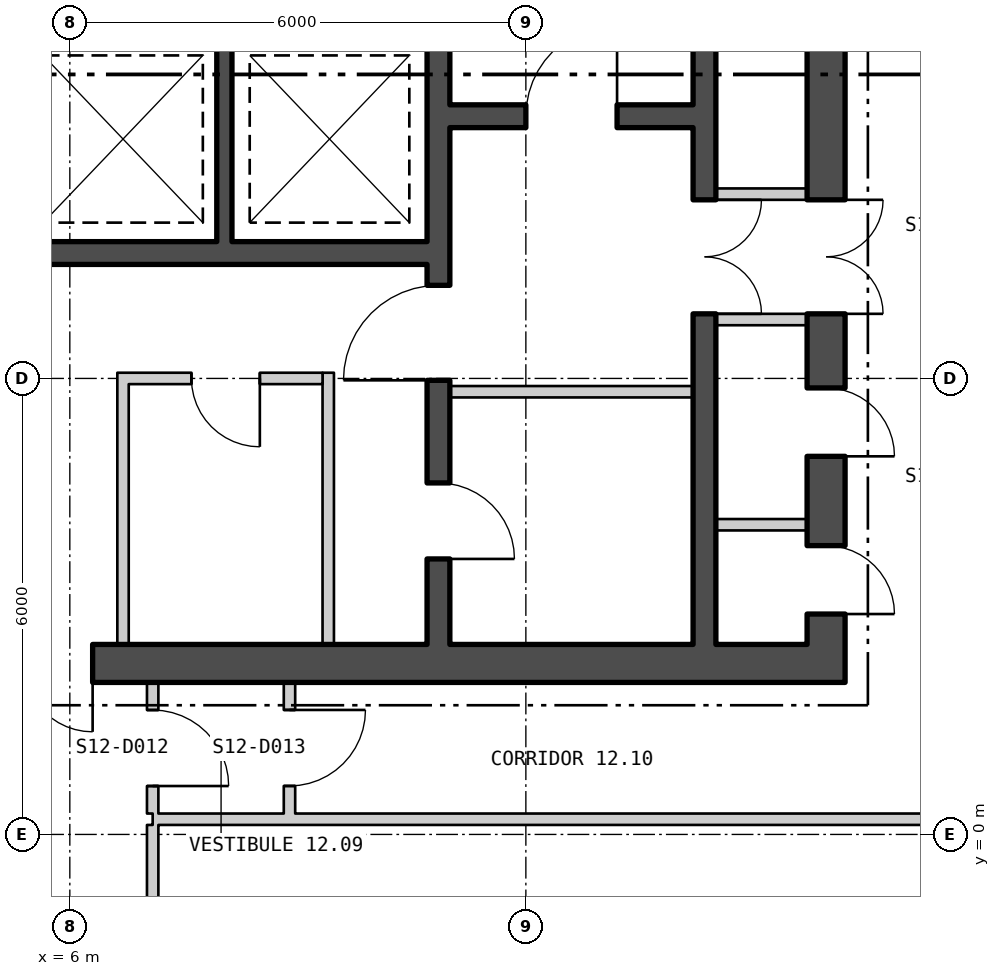
"""IFC4 building model, lengths in metres.
Left out: names, types, materials, properties, quantities, classifications, styles, units other than length and angle.
Written with IfcOpenShell. Run it as: python <this file> out.ifc"""

import sys

from ifc_helpers import new_model, si_unit, direction, frame, frame_2d, origin, place, context, subcontext, project, spatial, polyline, rectangle, outline, extrude, element, fill, save


model = new_model("IFC4")
c1 = context("Model", 3, precision=1e-05, world=origin(), true_north=direction((0.0, 1.0)))
c2 = subcontext(c1, "Body", "Model", "MODEL_VIEW")
j1 = project(units=[si_unit("LENGTHUNIT", "METRE"), si_unit("PLANEANGLEUNIT", "RADIAN")], contexts=[c1])
p1 = place(None, origin())
s1 = spatial("IfcSite", under=j1, at=p1, CompositionType="ELEMENT")
p2 = place(p1, origin())
s2 = spatial("IfcBuilding", under=s1, at=p2, CompositionType="ELEMENT")
p3 = place(p2, frame((0.0, 0.0, 163.2)))
s3 = spatial("IfcBuildingStorey", under=s2, at=p3, CompositionType="ELEMENT", Elevation=163.2)
p4 = place(p3, frame((4.055, -26.661, -0.18), z_axis=(0.0, 0.0, 1.0), x_axis=(0.499999764979, 0.866025539474, 0.0)))
e1 = element("IfcWall", 1, at=p4, inside=s3, PredefinedType="SOLIDWALL", context=c2, shape_type="SweptSolid", body=[
    extrude(outline(polyline([(-0.13, -0.225), (45.87, -0.225), (45.61, 0.225), (0.13, 0.225), (-0.13, -0.225)])), origin(), (0.0, 0.0, 1.0), 3.68),
])
p5 = place(p4, frame((1.424, 0.0, 1.08)))
e2 = element("IfcOpeningElement", 2, at=p5, cuts=e1, PredefinedType="OPENING", context=c2, shape_type="SweptSolid", body=[
    extrude(rectangle(XDim=2.4, YDim=2.0, at=frame_2d((1.2, 1.0))), frame((0.0, 0.235, 0.0), z_axis=(0.0, -1.0, 0.0), x_axis=(1.0, 0.0, 0.0)), (0.0, 0.0, 1.0), 0.47),
])
p6 = place(p4, frame((5.893, 0.0, 1.08)))
e3 = element("IfcOpeningElement", 3, at=p6, cuts=e1, PredefinedType="OPENING", context=c2, shape_type="SweptSolid", body=[
    extrude(rectangle(XDim=2.4, YDim=2.0, at=frame_2d((1.2, 1.0))), frame((0.0, 0.235, 0.0), z_axis=(0.0, -1.0, 0.0), x_axis=(1.0, 0.0, 0.0)), (0.0, 0.0, 1.0), 0.47),
])
p7 = place(p4, frame((10.401, 0.0, 1.08)))
e4 = element("IfcOpeningElement", 4, at=p7, cuts=e1, PredefinedType="OPENING", context=c2, shape_type="SweptSolid", body=[
    extrude(rectangle(XDim=2.4, YDim=2.0, at=frame_2d((1.2, 1.0))), frame((0.0, 0.235, 0.0), z_axis=(0.0, -1.0, 0.0), x_axis=(1.0, 0.0, 0.0)), (0.0, 0.0, 1.0), 0.47),
])
p8 = place(p4, frame((14.909, 0.0, 1.08)))
e5 = element("IfcOpeningElement", 5, at=p8, cuts=e1, PredefinedType="OPENING", context=c2, shape_type="SweptSolid", body=[
    extrude(rectangle(XDim=2.4, YDim=2.0, at=frame_2d((1.2, 1.0))), frame((0.0, 0.235, 0.0), z_axis=(0.0, -1.0, 0.0), x_axis=(1.0, 0.0, 0.0)), (0.0, 0.0, 1.0), 0.47),
])
p9 = place(p4, frame((19.416, 0.0, 1.08)))
e6 = element("IfcOpeningElement", 6, at=p9, cuts=e1, PredefinedType="OPENING", context=c2, shape_type="SweptSolid", body=[
    extrude(rectangle(XDim=2.4, YDim=2.0, at=frame_2d((1.2, 1.0))), frame((0.0, 0.235, 0.0), z_axis=(0.0, -1.0, 0.0), x_axis=(1.0, 0.0, 0.0)), (0.0, 0.0, 1.0), 0.47),
])
p10 = place(p4, frame((23.924, 0.0, 1.08)))
e7 = element("IfcOpeningElement", 7, at=p10, cuts=e1, PredefinedType="OPENING", context=c2, shape_type="SweptSolid", body=[
    extrude(rectangle(XDim=2.4, YDim=2.0, at=frame_2d((1.2, 1.0))), frame((0.0, 0.235, 0.0), z_axis=(0.0, -1.0, 0.0), x_axis=(1.0, 0.0, 0.0)), (0.0, 0.0, 1.0), 0.47),
])
p11 = place(p4, frame((28.431, 0.0, 1.08)))
e8 = element("IfcOpeningElement", 8, at=p11, cuts=e1, PredefinedType="OPENING", context=c2, shape_type="SweptSolid", body=[
    extrude(rectangle(XDim=2.4, YDim=2.0, at=frame_2d((1.2, 1.0))), frame((0.0, 0.235, 0.0), z_axis=(0.0, -1.0, 0.0), x_axis=(1.0, 0.0, 0.0)), (0.0, 0.0, 1.0), 0.47),
])
p12 = place(p4, frame((32.939, 0.0, 1.08)))
e9 = element("IfcOpeningElement", 9, at=p12, cuts=e1, PredefinedType="OPENING", context=c2, shape_type="SweptSolid", body=[
    extrude(rectangle(XDim=2.4, YDim=2.0, at=frame_2d((1.2, 1.0))), frame((0.0, 0.235, 0.0), z_axis=(0.0, -1.0, 0.0), x_axis=(1.0, 0.0, 0.0)), (0.0, 0.0, 1.0), 0.47),
])
p13 = place(p4, frame((37.447, 0.0, 1.08)))
e10 = element("IfcOpeningElement", 10, at=p13, cuts=e1, PredefinedType="OPENING", context=c2, shape_type="SweptSolid", body=[
    extrude(rectangle(XDim=2.4, YDim=2.0, at=frame_2d((1.2, 1.0))), frame((0.0, 0.235, 0.0), z_axis=(0.0, -1.0, 0.0), x_axis=(1.0, 0.0, 0.0)), (0.0, 0.0, 1.0), 0.47),
])
p14 = place(p4, frame((41.916, 0.0, 1.08)))
e11 = element("IfcOpeningElement", 11, at=p14, cuts=e1, PredefinedType="OPENING", context=c2, shape_type="SweptSolid", body=[
    extrude(rectangle(XDim=2.4, YDim=2.0, at=frame_2d((1.2, 1.0))), frame((0.0, 0.235, 0.0), z_axis=(0.0, -1.0, 0.0), x_axis=(1.0, 0.0, 0.0)), (0.0, 0.0, 1.0), 0.47),
])
p15 = place(p3, frame((-16.2, 2.25, 0.0), z_axis=(0.0, 0.0, 1.0), x_axis=(1.0, 0.0, 0.0)))
e12 = element("IfcWall", 12, at=p15, inside=s3, PredefinedType="SHEAR", context=c2, shape_type="SweptSolid", body=[
    extrude(rectangle(XDim=32.4, YDim=0.5, at=frame_2d((16.2, 0.0))), origin(), (0.0, 0.0, 1.0), 3.7),
])
p16 = place(p15, frame((10.7, 0.0, 0.0)))
e13 = element("IfcOpeningElement", 13, at=p16, cuts=e12, PredefinedType="OPENING", context=c2, shape_type="SweptSolid", body=[
    extrude(rectangle(XDim=1.8, YDim=2.4, at=frame_2d((0.9, 1.2))), frame((0.0, 0.26, 0.0), z_axis=(0.0, -1.0, 0.0), x_axis=(1.0, 0.0, 0.0)), (0.0, 0.0, 1.0), 0.52),
])
p17 = place(p15, frame((20.7, 0.0, 0.0)))
e14 = element("IfcOpeningElement", 14, at=p17, cuts=e12, PredefinedType="OPENING", context=c2, shape_type="SweptSolid", body=[
    extrude(rectangle(XDim=1.8, YDim=2.4, at=frame_2d((0.9, 1.2))), frame((0.0, 0.26, 0.0), z_axis=(0.0, -1.0, 0.0), x_axis=(1.0, 0.0, 0.0)), (0.0, 0.0, 1.0), 0.52),
])
p18 = place(p3, frame((15.95, 2.5, 0.0), z_axis=(0.0, 0.0, 1.0), x_axis=(0.0, 1.0, 0.0)))
e15 = element("IfcWall", 15, at=p18, inside=s3, PredefinedType="SHEAR", context=c2, shape_type="SweptSolid", body=[
    extrude(rectangle(XDim=15.0, YDim=0.5, at=frame_2d((7.5, 0.0))), origin(), (0.0, 0.0, 1.0), 3.7),
])
p19 = place(p18, frame((4.35, 0.0, 0.0)))
e16 = element("IfcOpeningElement", 16, at=p19, cuts=e15, PredefinedType="OPENING", context=c2, shape_type="SweptSolid", body=[
    extrude(rectangle(XDim=1.5, YDim=2.1, at=frame_2d((0.75, 1.05))), frame((0.0, 0.26, 0.0), z_axis=(0.0, -1.0, 0.0), x_axis=(1.0, 0.0, 0.0)), (0.0, 0.0, 1.0), 0.52),
])
p20 = place(p18, frame((0.4, 0.0, 0.0)))
e17 = element("IfcOpeningElement", 17, at=p20, cuts=e15, PredefinedType="OPENING", context=c2, shape_type="SweptSolid", body=[
    extrude(rectangle(XDim=0.9, YDim=2.1, at=frame_2d((0.45, 1.05))), frame((0.0, 0.26, 0.0), z_axis=(0.0, -1.0, 0.0), x_axis=(1.0, 0.0, 0.0)), (0.0, 0.0, 1.0), 0.52),
])
p21 = place(p18, frame((2.475, 0.0, 0.0)))
e18 = element("IfcOpeningElement", 18, at=p21, cuts=e15, PredefinedType="OPENING", context=c2, shape_type="SweptSolid", body=[
    extrude(rectangle(XDim=0.9, YDim=2.1, at=frame_2d((0.45, 1.05))), frame((0.0, 0.26, 0.0), z_axis=(0.0, -1.0, 0.0), x_axis=(1.0, 0.0, 0.0)), (0.0, 0.0, 1.0), 0.52),
])
p22 = place(p18, frame((9.163, 0.0, 0.0)))
e19 = element("IfcOpeningElement", 19, at=p22, cuts=e15, PredefinedType="OPENING", context=c2, shape_type="SweptSolid", body=[
    extrude(rectangle(XDim=0.9, YDim=2.1, at=frame_2d((0.45, 1.05))), frame((0.0, 0.26, 0.0), z_axis=(0.0, -1.0, 0.0), x_axis=(1.0, 0.0, 0.0)), (0.0, 0.0, 1.0), 0.52),
])
p23 = place(p18, frame((13.6, 0.0, 0.0)))
e20 = element("IfcOpeningElement", 20, at=p23, cuts=e15, PredefinedType="OPENING", context=c2, shape_type="SweptSolid", body=[
    extrude(rectangle(XDim=1.0, YDim=2.1, at=frame_2d((0.5, 1.05))), frame((0.0, 0.26, 0.0), z_axis=(0.0, -1.0, 0.0), x_axis=(1.0, 0.0, 0.0)), (0.0, 0.0, 1.0), 0.52),
])
p24 = place(p3, frame((10.85, 2.5, 0.0), z_axis=(0.0, 0.0, 1.0), x_axis=(0.0, 1.0, 0.0)))
e21 = element("IfcWall", 21, at=p24, inside=s3, PredefinedType="SHEAR", context=c2, shape_type="SweptSolid", body=[
    extrude(rectangle(XDim=15.0, YDim=0.3, at=frame_2d((7.5, 0.0))), origin(), (0.0, 0.0, 1.0), 3.7),
])
p25 = place(p24, frame((3.475, 0.0, 0.0)))
e22 = element("IfcOpeningElement", 22, at=p25, cuts=e21, PredefinedType="OPENING", context=c2, shape_type="SweptSolid", body=[
    extrude(rectangle(XDim=1.25, YDim=2.1, at=frame_2d((0.625, 1.05))), frame((0.0, 0.16, 0.0), z_axis=(0.0, -1.0, 0.0), x_axis=(1.0, 0.0, 0.0)), (0.0, 0.0, 1.0), 0.32),
])
p26 = place(p24, frame((1.125, 0.0, 0.0)))
e23 = element("IfcOpeningElement", 23, at=p26, cuts=e21, PredefinedType="OPENING", context=c2, shape_type="SweptSolid", body=[
    extrude(rectangle(XDim=1.0, YDim=2.1, at=frame_2d((0.5, 1.05))), frame((0.0, 0.16, 0.0), z_axis=(0.0, -1.0, 0.0), x_axis=(1.0, 0.0, 0.0)), (0.0, 0.0, 1.0), 0.32),
])
p27 = place(p3, frame((14.35, 2.5, 0.0), z_axis=(0.0, 0.0, 1.0), x_axis=(0.0, 1.0, 0.0)))
e24 = element("IfcWall", 24, at=p27, inside=s3, PredefinedType="SHEAR", context=c2, shape_type="SweptSolid", body=[
    extrude(rectangle(XDim=15.0, YDim=0.3, at=frame_2d((7.5, 0.0))), origin(), (0.0, 0.0, 1.0), 3.7),
])
p28 = place(p27, frame((4.35, 0.0, 0.0)))
e25 = element("IfcOpeningElement", 25, at=p28, cuts=e24, PredefinedType="OPENING", context=c2, shape_type="SweptSolid", body=[
    extrude(rectangle(XDim=1.5, YDim=2.1, at=frame_2d((0.75, 1.05))), frame((0.0, 0.16, 0.0), z_axis=(0.0, -1.0, 0.0), x_axis=(1.0, 0.0, 0.0)), (0.0, 0.0, 1.0), 0.32),
])
p29 = place(p3, frame((11.0, 9.45, 0.0), z_axis=(0.0, 0.0, 1.0), x_axis=(1.0, 0.0, 0.0)))
e26 = element("IfcWall", 26, at=p29, inside=s3, PredefinedType="SHEAR", context=c2, shape_type="SweptSolid", body=[
    extrude(rectangle(XDim=3.2, YDim=0.3, at=frame_2d((1.6, 0.0))), origin(), (0.0, 0.0, 1.0), 3.7),
])
p30 = place(p29, frame((1.0, 0.0, 0.0)))
e27 = element("IfcOpeningElement", 27, at=p30, cuts=e26, PredefinedType="OPENING", context=c2, shape_type="SweptSolid", body=[
    extrude(rectangle(XDim=1.2, YDim=2.1, at=frame_2d((0.6, 1.05))), frame((0.0, 0.16, 0.0), z_axis=(0.0, -1.0, 0.0), x_axis=(1.0, 0.0, 0.0)), (0.0, 0.0, 1.0), 0.32),
])
p31 = place(p3, frame((2.6, 7.65, 0.0), z_axis=(0.0, 0.0, 1.0), x_axis=(1.0, 0.0, 0.0)))
e28 = element("IfcWall", 28, at=p31, inside=s3, PredefinedType="SHEAR", context=c2, shape_type="SweptSolid", body=[
    extrude(rectangle(XDim=8.1, YDim=0.3, at=frame_2d((4.05, 0.0))), origin(), (0.0, 0.0, 1.0), 3.7),
])
p32 = place(p3, frame((8.033, 7.8, 0.0), z_axis=(0.0, 0.0, 1.0), x_axis=(0.0, 1.0, 0.0)))
e29 = element("IfcWall", 29, at=p32, inside=s3, PredefinedType="SHEAR", context=c2, shape_type="SweptSolid", body=[
    extrude(rectangle(XDim=2.7, YDim=0.2, at=frame_2d((1.35, 0.0))), origin(), (0.0, 0.0, 1.0), 3.7),
])
p33 = place(p3, frame((11.0, 5.825, 0.0), z_axis=(0.0, 0.0, 1.0), x_axis=(1.0, 0.0, 0.0)))
e30 = element("IfcWall", 30, at=p33, inside=s3, PredefinedType="PARTITIONING", context=c2, shape_type="SweptSolid", body=[
    extrude(rectangle(XDim=3.2, YDim=0.15, at=frame_2d((1.6, 0.0))), origin(), (0.0, 0.0, 1.0), 3.7),
])
for number, where, z_axis, x_axis in (
    (31, (14.5, 6.775, 0.0), (0.0, 0.0, 1.0), (1.0, 0.0, 0.0)),
    (32, (14.5, 8.425, 0.0), (0.0, 0.0, 1.0), (1.0, 0.0, 0.0)),
    (33, (14.5, 4.075, 0.0), (0.0, 0.0, 1.0), (1.0, 0.0, 0.0)),
):
    element("IfcWall", number, at=place(p3, frame(where, z_axis=z_axis, x_axis=x_axis)), inside=s3, PredefinedType="PARTITIONING", context=c2, shape_type="SweptSolid", body=[
        extrude(rectangle(XDim=1.2, YDim=0.15, at=frame_2d((0.6, 0.0))), origin(), (0.0, 0.0, 1.0), 3.7),
    ])
for number, where, z_axis, x_axis in (
    (34, (6.7, 2.5, 0.0), (0.0, 0.0, 1.0), (0.0, 1.0, 0.0)),
    (35, (9.4, 2.5, 0.0), (0.0, 0.0, 1.0), (0.0, 1.0, 0.0)),
):
    element("IfcWall", number, at=place(p3, frame(where, z_axis=z_axis, x_axis=x_axis)), inside=s3, PredefinedType="PARTITIONING", context=c2, shape_type="SweptSolid", body=[
        extrude(rectangle(XDim=3.575, YDim=0.15, at=frame_2d((1.788, 0.0))), origin(), (0.0, 0.0, 1.0), 3.7),
    ])
p34 = place(p3, frame((6.775, 6.0, 0.0), z_axis=(0.0, 0.0, 1.0), x_axis=(1.0, 0.0, 0.0)))
e36 = element("IfcWall", 36, at=p34, inside=s3, PredefinedType="PARTITIONING", context=c2, shape_type="SweptSolid", body=[
    extrude(rectangle(XDim=2.55, YDim=0.15, at=frame_2d((1.275, 0.0))), origin(), (0.0, 0.0, 1.0), 3.7),
])
p35 = place(p34, frame((0.825, 0.0, 0.0)))
e37 = element("IfcOpeningElement", 37, at=p35, cuts=e36, PredefinedType="OPENING", context=c2, shape_type="SweptSolid", body=[
    extrude(rectangle(XDim=0.9, YDim=2.1, at=frame_2d((0.45, 1.05))), frame((0.0, 0.085, 0.0), z_axis=(0.0, -1.0, 0.0), x_axis=(1.0, 0.0, 0.0)), (0.0, 0.0, 1.0), 0.17),
])
p36 = place(p3, frame((7.09, -1.125, 0.0), z_axis=(0.0, 0.0, 1.0), x_axis=(0.0, 1.0, 0.0)))
e38 = element("IfcWall", 38, at=p36, inside=s3, PredefinedType="PARTITIONING", context=c2, shape_type="SweptSolid", body=[
    extrude(rectangle(XDim=1.25, YDim=0.15, at=frame_2d((0.625, 0.0))), origin(), (0.0, 0.0, 1.0), 3.7),
])
p37 = place(p3, frame((7.09, 0.2, 0.0), z_axis=(0.0, 0.0, 1.0), x_axis=(1.0, 0.0, 0.0)))
e39 = element("IfcWall", 39, at=p37, inside=s3, PredefinedType="PARTITIONING", context=c2, shape_type="SweptSolid", body=[
    extrude(rectangle(XDim=10.835, YDim=0.15, at=frame_2d((5.418, 0.0))), origin(), (0.0, 0.0, 1.0), 3.7),
])
p38 = place(p3, frame((7.09, 0.275, 0.0), z_axis=(0.0, 0.0, 1.0), x_axis=(0.0, 1.0, 0.0)))
e40 = element("IfcWall", 40, at=p38, inside=s3, PredefinedType="PARTITIONING", context=c2, shape_type="SweptSolid", body=[
    extrude(rectangle(XDim=1.725, YDim=0.15, at=frame_2d((0.863, 0.0))), origin(), (0.0, 0.0, 1.0), 3.7),
])
p39 = place(p38, frame((0.362, 0.0, 0.0)))
e41 = element("IfcOpeningElement", 41, at=p39, cuts=e40, PredefinedType="OPENING", context=c2, shape_type="SweptSolid", body=[
    extrude(rectangle(XDim=1.0, YDim=2.1, at=frame_2d((0.5, 1.05))), frame((0.0, 0.085, 0.0), z_axis=(0.0, -1.0, 0.0), x_axis=(1.0, 0.0, 0.0)), (0.0, 0.0, 1.0), 0.17),
])
p40 = place(p3, frame((8.89, 0.275, 0.0), z_axis=(0.0, 0.0, 1.0), x_axis=(0.0, 1.0, 0.0)))
e42 = element("IfcWall", 42, at=p40, inside=s3, PredefinedType="PARTITIONING", context=c2, shape_type="SweptSolid", body=[
    extrude(rectangle(XDim=1.725, YDim=0.15, at=frame_2d((0.863, 0.0))), origin(), (0.0, 0.0, 1.0), 3.7),
])
p41 = place(p40, frame((0.363, 0.0, 0.0)))
e43 = element("IfcOpeningElement", 43, at=p41, cuts=e42, PredefinedType="OPENING", context=c2, shape_type="SweptSolid", body=[
    extrude(rectangle(XDim=1.0, YDim=2.1, at=frame_2d((0.5, 1.05))), frame((0.0, 0.085, 0.0), z_axis=(0.0, -1.0, 0.0), x_axis=(1.0, 0.0, 0.0)), (0.0, 0.0, 1.0), 0.17),
])
p42 = place(p30, origin())
e44 = element("IfcDoor", 44, at=p42, inside=s3, OperationType="SINGLE_SWING_LEFT", PredefinedType="DOOR", context=c2, shape_type="SweptSolid", body=[
    extrude(rectangle(XDim=1.2, YDim=2.1, at=frame_2d((0.6, 1.05))), frame((0.0, 0.025, 0.0), z_axis=(0.0, -1.0, 0.0), x_axis=(1.0, 0.0, 0.0)), (0.0, 0.0, 1.0), 0.05),
])
fill(e27, e44)
p43 = place(p25, origin())
e45 = element("IfcDoor", 45, at=p43, inside=s3, OperationType="SINGLE_SWING_RIGHT", PredefinedType="DOOR", context=c2, shape_type="SweptSolid", body=[
    extrude(rectangle(XDim=1.25, YDim=2.1, at=frame_2d((0.625, 1.05))), frame((0.0, 0.025, 0.0), z_axis=(0.0, -1.0, 0.0), x_axis=(1.0, 0.0, 0.0)), (0.0, 0.0, 1.0), 0.05),
])
fill(e22, e45)
p44 = place(p26, origin())
e46 = element("IfcDoor", 46, at=p44, inside=s3, OperationType="SINGLE_SWING_LEFT", PredefinedType="DOOR", context=c2, shape_type="SweptSolid", body=[
    extrude(rectangle(XDim=1.0, YDim=2.1, at=frame_2d((0.5, 1.05))), frame((0.0, 0.025, 0.0), z_axis=(0.0, -1.0, 0.0), x_axis=(1.0, 0.0, 0.0)), (0.0, 0.0, 1.0), 0.05),
])
fill(e23, e46)
p45 = place(p28, origin())
e47 = element("IfcDoor", 47, at=p45, inside=s3, OperationType="DOUBLE_DOOR_SINGLE_SWING", PredefinedType="DOOR", context=c2, shape_type="SweptSolid", body=[
    extrude(rectangle(XDim=1.5, YDim=2.1, at=frame_2d((0.75, 1.05))), frame((0.0, 0.025, 0.0), z_axis=(0.0, -1.0, 0.0), x_axis=(1.0, 0.0, 0.0)), (0.0, 0.0, 1.0), 0.05),
])
fill(e25, e47)
p46 = place(p19, origin())
e48 = element("IfcDoor", 48, at=p46, inside=s3, OperationType="DOUBLE_DOOR_SINGLE_SWING", PredefinedType="DOOR", context=c2, shape_type="SweptSolid", body=[
    extrude(rectangle(XDim=1.5, YDim=2.1, at=frame_2d((0.75, 1.05))), frame((0.0, 0.025, 0.0), z_axis=(0.0, -1.0, 0.0), x_axis=(1.0, 0.0, 0.0)), (0.0, 0.0, 1.0), 0.05),
])
fill(e16, e48)
p47 = place(p20, origin())
e49 = element("IfcDoor", 49, at=p47, inside=s3, OperationType="SINGLE_SWING_LEFT", PredefinedType="DOOR", context=c2, shape_type="SweptSolid", body=[
    extrude(rectangle(XDim=0.9, YDim=2.1, at=frame_2d((0.45, 1.05))), frame((0.0, 0.025, 0.0), z_axis=(0.0, -1.0, 0.0), x_axis=(1.0, 0.0, 0.0)), (0.0, 0.0, 1.0), 0.05),
])
fill(e17, e49)
p48 = place(p21, origin())
e50 = element("IfcDoor", 50, at=p48, inside=s3, OperationType="SINGLE_SWING_LEFT", PredefinedType="DOOR", context=c2, shape_type="SweptSolid", body=[
    extrude(rectangle(XDim=0.9, YDim=2.1, at=frame_2d((0.45, 1.05))), frame((0.0, 0.025, 0.0), z_axis=(0.0, -1.0, 0.0), x_axis=(1.0, 0.0, 0.0)), (0.0, 0.0, 1.0), 0.05),
])
fill(e18, e50)
p49 = place(p35, origin())
e51 = element("IfcDoor", 51, at=p49, inside=s3, OperationType="SINGLE_SWING_RIGHT", PredefinedType="DOOR", context=c2, shape_type="SweptSolid", body=[
    extrude(rectangle(XDim=0.9, YDim=2.1, at=frame_2d((0.45, 1.05))), frame((0.0, 0.025, 0.0), z_axis=(0.0, -1.0, 0.0), x_axis=(1.0, 0.0, 0.0)), (0.0, 0.0, 1.0), 0.05),
])
fill(e37, e51)
p50 = place(p17, origin())
e52 = element("IfcDoor", 52, at=p50, inside=s3, OperationType="DOUBLE_DOOR_SINGLE_SWING", PredefinedType="DOOR", context=c2, shape_type="SweptSolid", body=[
    extrude(rectangle(XDim=1.8, YDim=2.4, at=frame_2d((0.9, 1.2))), frame((0.0, 0.025, 0.0), z_axis=(0.0, -1.0, 0.0), x_axis=(1.0, 0.0, 0.0)), (0.0, 0.0, 1.0), 0.05),
])
fill(e14, e52)
p51 = place(p39, origin())
e53 = element("IfcDoor", 53, at=p51, inside=s3, OperationType="SINGLE_SWING_LEFT", PredefinedType="DOOR", context=c2, shape_type="SweptSolid", body=[
    extrude(rectangle(XDim=1.0, YDim=2.1, at=frame_2d((0.5, 1.05))), frame((0.0, 0.025, 0.0), z_axis=(0.0, -1.0, 0.0), x_axis=(1.0, 0.0, 0.0)), (0.0, 0.0, 1.0), 0.05),
])
fill(e41, e53)
p52 = place(p41, origin())
e54 = element("IfcDoor", 54, at=p52, inside=s3, OperationType="SINGLE_SWING_RIGHT", PredefinedType="DOOR", context=c2, shape_type="SweptSolid", body=[
    extrude(rectangle(XDim=1.0, YDim=2.1, at=frame_2d((0.5, 1.05))), frame((0.0, 0.025, 0.0), z_axis=(0.0, -1.0, 0.0), x_axis=(1.0, 0.0, 0.0)), (0.0, 0.0, 1.0), 0.05),
])
fill(e43, e54)
save(model, sys.argv[1])
